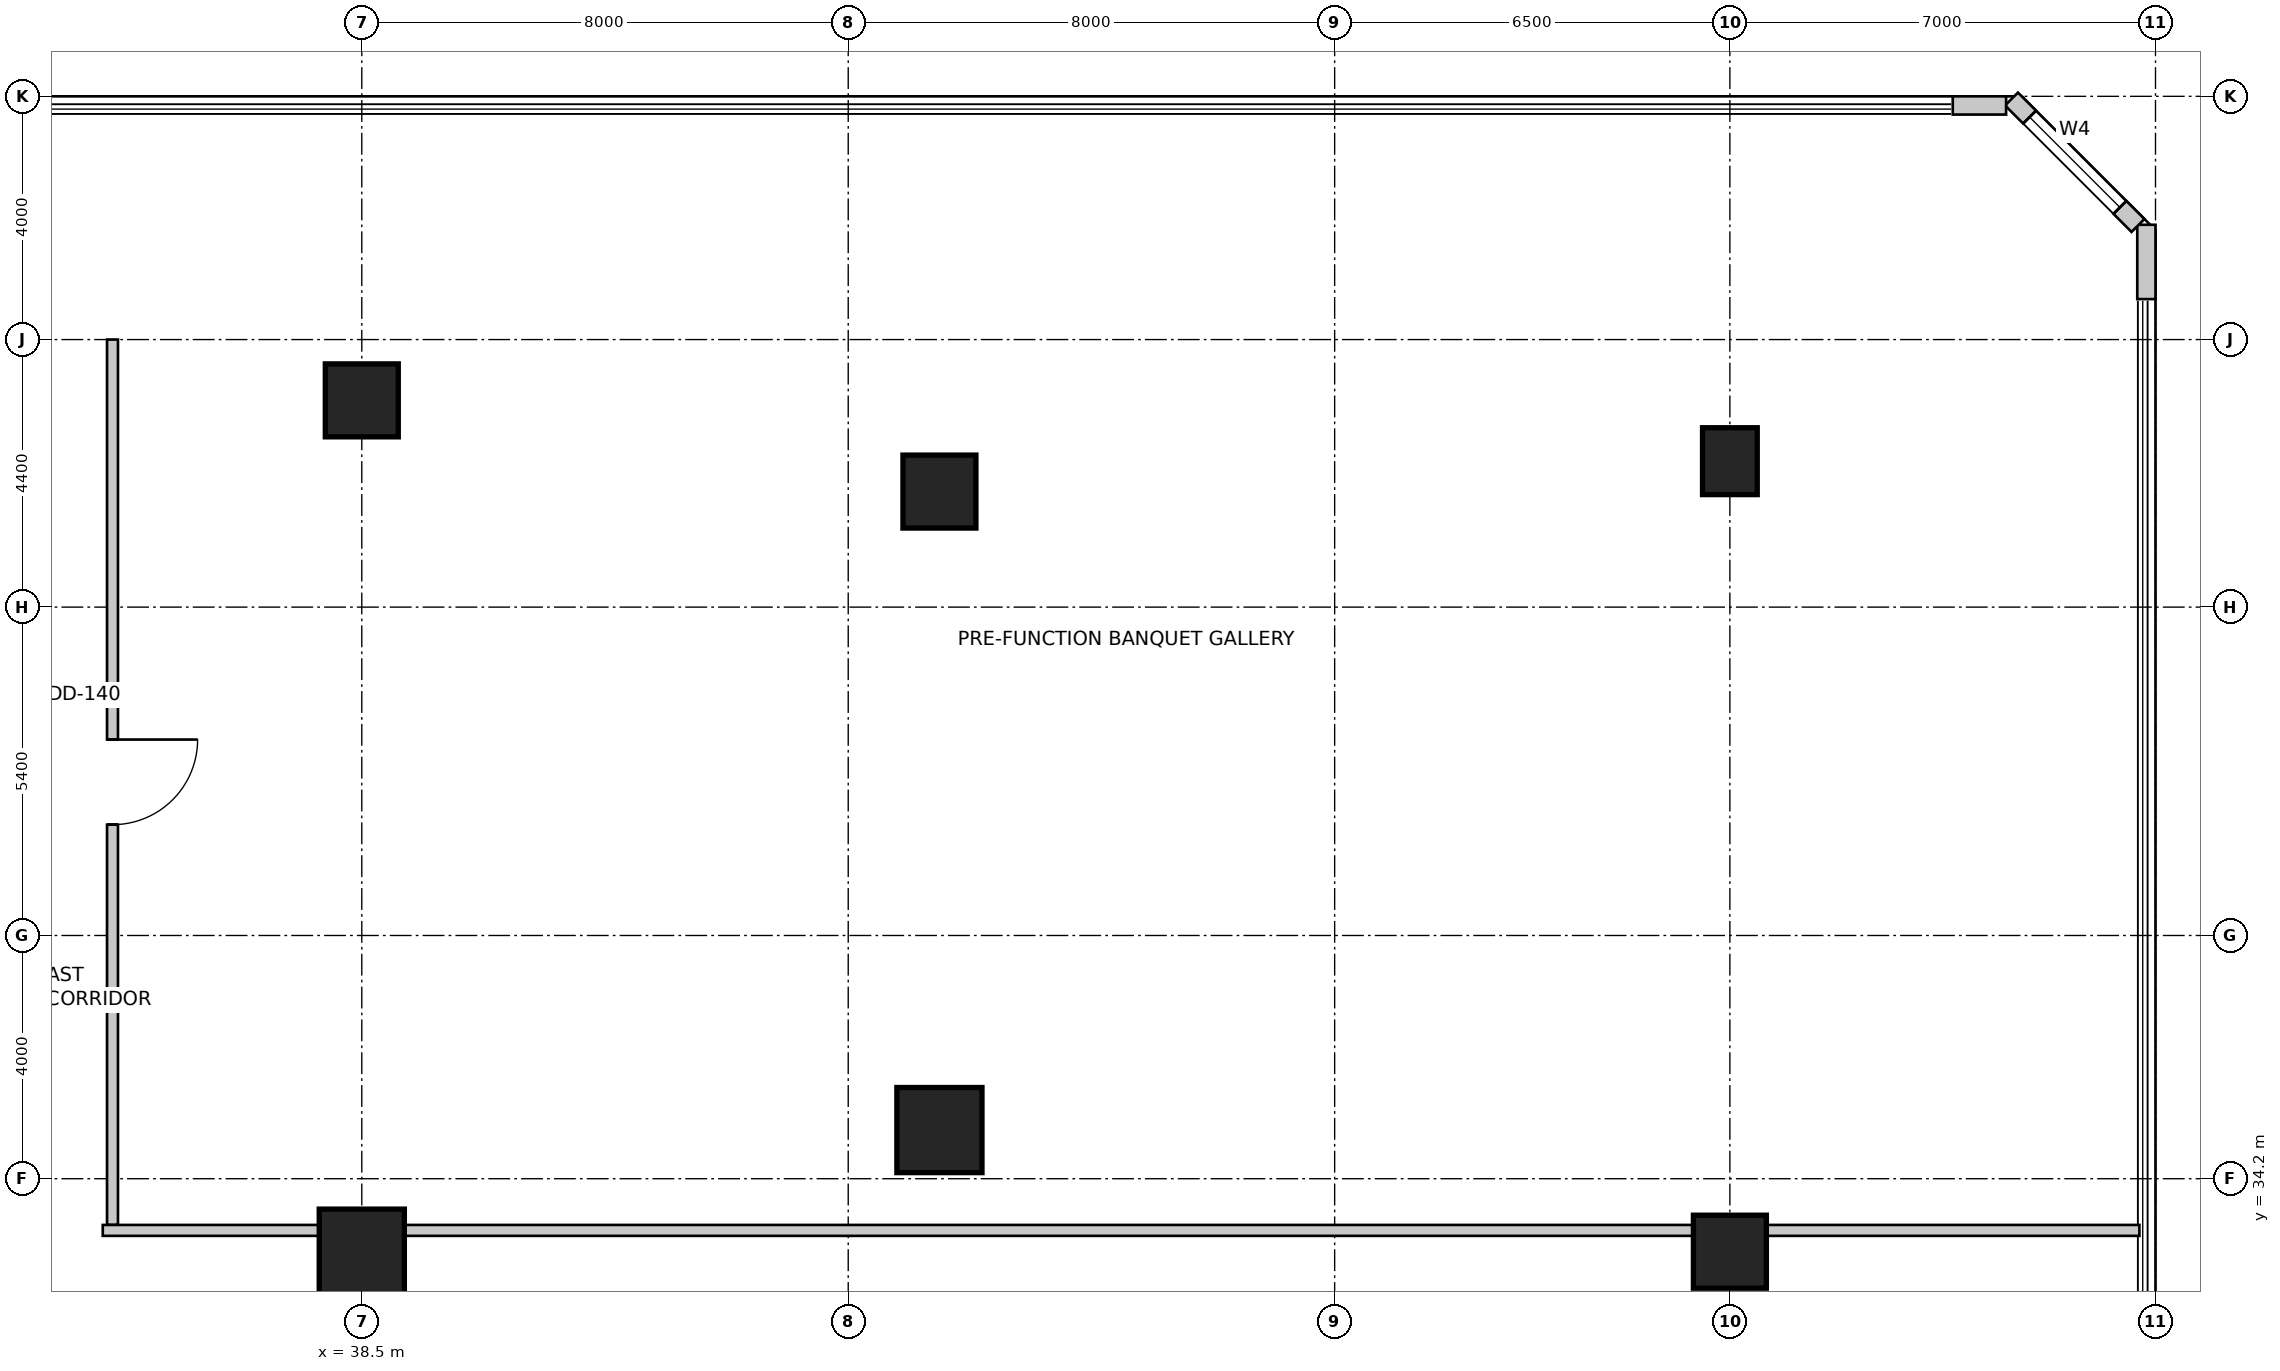
"""IFC4 building model, lengths in metres.
Left out: names, types, materials, properties, quantities, classifications, styles, units other than length and angle.
Written with IfcOpenShell. Run it as: python <this file> out.ifc"""

import sys

from ifc_helpers import new_model, si_unit, direction, frame, frame_2d, origin, origin_2d, place, context, subcontext, project, spatial, rectangle, extrude, source, transform, mapped, element, fill, save


model = new_model("IFC4")
c1 = context("Model", 3, precision=1e-05, world=origin(), true_north=direction((0.0, 1.0)))
c2 = subcontext(c1, "Body", "Model", "MODEL_VIEW")
j1 = project(units=[si_unit("LENGTHUNIT", "METRE"), si_unit("PLANEANGLEUNIT", "RADIAN")], contexts=[c1])
p1 = place(None, origin())
s1 = spatial("IfcSite", under=j1, at=p1, CompositionType="ELEMENT")
p2 = place(p1, origin())
s2 = spatial("IfcBuilding", under=s1, at=p2, CompositionType="ELEMENT")
p3 = place(p2, frame((0.0, 0.0, 11.2)))
s3 = spatial("IfcBuildingStorey", under=s2, at=p3, CompositionType="ELEMENT", Elevation=11.2)
m1 = source(origin(), c2, "Body", "SweptSolid", [
    extrude(rectangle(XDim=1.4, YDim=1.4, at=origin_2d()), origin(), (0.0, 0.0, 1.0), 5.2),
])
for number, where, z_axis, x_axis in (
    (1, (38.5, 33.0, 0.0), (0.0, 0.0, 1.0), (1.0, 0.0, 0.0)),
    (2, (48.0, 35.0, 0.0), (0.0, 0.0, 1.0), (1.0, 0.0, 0.0)),
):
    element("IfcColumn", number, at=place(p3, frame(where, z_axis=z_axis, x_axis=x_axis)), inside=s3, PredefinedType="COLUMN", context=c2, shape_type="MappedRepresentation", body=[
        mapped(m1, transform((0.0, 0.0, 0.0), scale=1.0)),
    ])
m2 = source(origin(), c2, "Body", "SweptSolid", [
    extrude(rectangle(XDim=1.2, YDim=1.2, at=origin_2d()), origin(), (0.0, 0.0, 1.0), 5.2),
])
for number, where, z_axis, x_axis in (
    (3, (61.0, 33.0, 0.0), (0.0, 0.0, 1.0), (1.0, 0.0, 0.0)),
    (4, (38.5, 47.0, 0.0), (0.0, 0.0, 1.0), (1.0, 0.0, 0.0)),
    (5, (48.0, 45.5, 0.0), (0.0, 0.0, 1.0), (1.0, 0.0, 0.0)),
):
    element("IfcColumn", number, at=place(p3, frame(where, z_axis=z_axis, x_axis=x_axis)), inside=s3, PredefinedType="COLUMN", context=c2, shape_type="MappedRepresentation", body=[
        mapped(m2, transform((0.0, 0.0, 0.0), scale=1.0)),
    ])
m3 = source(origin(), c2, "Body", "SweptSolid", [
    extrude(rectangle(XDim=0.9, YDim=1.1, at=origin_2d()), origin(), (0.0, 0.0, 1.0), 5.2),
])
p4 = place(p3, frame((61.0, 46.0, 0.0), z_axis=(0.0, 0.0, 1.0), x_axis=(1.0, 0.0, 0.0)))
e6 = element("IfcColumn", 6, at=p4, inside=s3, PredefinedType="COLUMN", context=c2, shape_type="MappedRepresentation", body=[
    mapped(m3, transform((0.0, 0.0, 0.0), scale=1.0)),
])
p5 = place(p3, frame((67.85, 48.665, 0.0), z_axis=(0.0, 0.0, 1.0), x_axis=(0.0, 1.0, 0.0)))
e7 = element("IfcWall", 7, at=p5, inside=s3, PredefinedType="SOLIDWALL", context=c2, shape_type="SweptSolid", body=[
    extrude(rectangle(XDim=1.223, YDim=0.3, at=frame_2d((0.611, 0.0))), origin(), (0.0, 0.0, 1.0), 4.9),
])
p6 = place(p3, frame((67.712, 49.876, 0.0), z_axis=(0.0, 0.0, 1.0), x_axis=(-0.707106781187, 0.707106781187, 0.0)))
e8 = element("IfcWall", 8, at=p6, inside=s3, PredefinedType="SOLIDWALL", context=c2, shape_type="SweptSolid", body=[
    extrude(rectangle(XDim=2.942, YDim=0.3, at=frame_2d((1.471, 0.0))), origin(), (0.0, 0.0, 1.0), 4.9),
])
m4 = source(origin(), c2, "Body", "SweptSolid", [
    extrude(rectangle(XDim=2.1, YDim=2.0, at=frame_2d((1.05, 1.0))), frame((0.0, 0.16, 0.0), z_axis=(0.0, -1.0, 0.0), x_axis=(1.0, 0.0, 0.0)), (0.0, 0.0, 1.0), 0.32),
])
p7 = place(p6, frame((0.421, 0.0, 0.85)))
e9 = element("IfcOpeningElement", 9, at=p7, cuts=e8, PredefinedType="OPENING", context=c2, shape_type="MappedRepresentation", body=[
    mapped(m4, transform((0.0, 0.0, 0.0), scale=1.0)),
])
p8 = place(p3, frame((65.543, 51.85, 0.0), z_axis=(0.0, 0.0, 1.0), x_axis=(-1.0, 0.0, 0.0)))
e10 = element("IfcWall", 10, at=p8, inside=s3, PredefinedType="SOLIDWALL", context=c2, shape_type="SweptSolid", body=[
    extrude(rectangle(XDim=0.877, YDim=0.3, at=frame_2d((0.439, 0.0))), origin(), (0.0, 0.0, 1.0), 4.9),
])
p9 = place(p3, frame((34.24, 33.35, 0.0), z_axis=(0.0, 0.0, 1.0), x_axis=(1.0, 0.0, 0.0)))
e11 = element("IfcWall", 11, at=p9, inside=s3, PredefinedType="PARTITIONING", context=c2, shape_type="SweptSolid", body=[
    extrude(rectangle(XDim=33.495, YDim=0.18, at=frame_2d((16.748, 0.0))), origin(), (0.0, 0.0, 1.0), 3.092),
])
p10 = place(p3, frame((34.4, 48.0, 0.0), z_axis=(0.0, 0.0, 1.0), x_axis=(0.0, -1.0, 0.0)))
e12 = element("IfcWall", 12, at=p10, inside=s3, PredefinedType="PARTITIONING", context=c2, shape_type="SweptSolid", body=[
    extrude(rectangle(XDim=14.556, YDim=0.18, at=frame_2d((7.278, 0.0))), origin(), (0.0, 0.0, 1.0), 3.942),
])
m5 = source(origin(), c2, "Body", "SweptSolid", [
    extrude(rectangle(XDim=1.4, YDim=2.15, at=frame_2d((0.7, 1.075))), frame((0.0, 0.1, 0.0), z_axis=(0.0, -1.0, 0.0), x_axis=(1.0, 0.0, 0.0)), (0.0, 0.0, 1.0), 0.2),
])
p11 = place(p10, frame((6.578, 0.0, 0.0)))
e13 = element("IfcOpeningElement", 13, at=p11, cuts=e12, PredefinedType="OPENING", context=c2, shape_type="MappedRepresentation", body=[
    mapped(m5, transform((0.0, 0.0, 0.0), scale=1.0)),
])
m6 = source(origin(), c2, "Body", "SweptSolid", [
    extrude(rectangle(XDim=2.1, YDim=2.0, at=frame_2d((1.05, 1.0))), frame((0.0, -0.015, 0.0), z_axis=(0.0, -1.0, 0.0), x_axis=(1.0, 0.0, 0.0)), (0.0, 0.0, 1.0), 0.06),
])
p12 = place(p7, origin())
e14 = element("IfcWindow", 14, at=p12, inside=s3, PartitioningType="SINGLE_PANEL", PredefinedType="WINDOW", context=c2, shape_type="MappedRepresentation", body=[
    mapped(m6, transform((0.0, 0.0, 0.0), scale=1.0)),
])
fill(e9, e14)
m7 = source(origin(), c2, "Body", "SweptSolid", [
    extrude(rectangle(XDim=1.4, YDim=2.15, at=frame_2d((0.7, 1.075))), frame((0.0, 0.025, 0.0), z_axis=(0.0, -1.0, 0.0), x_axis=(1.0, 0.0, 0.0)), (0.0, 0.0, 1.0), 0.05),
])
p13 = place(p11, origin())
e15 = element("IfcDoor", 15, at=p13, inside=s3, OperationType="SINGLE_SWING_LEFT", PredefinedType="DOOR", context=c2, shape_type="MappedRepresentation", body=[
    mapped(m7, transform((0.0, 0.0, 0.0), scale=1.0)),
])
fill(e13, e15)
save(model, sys.argv[1])
